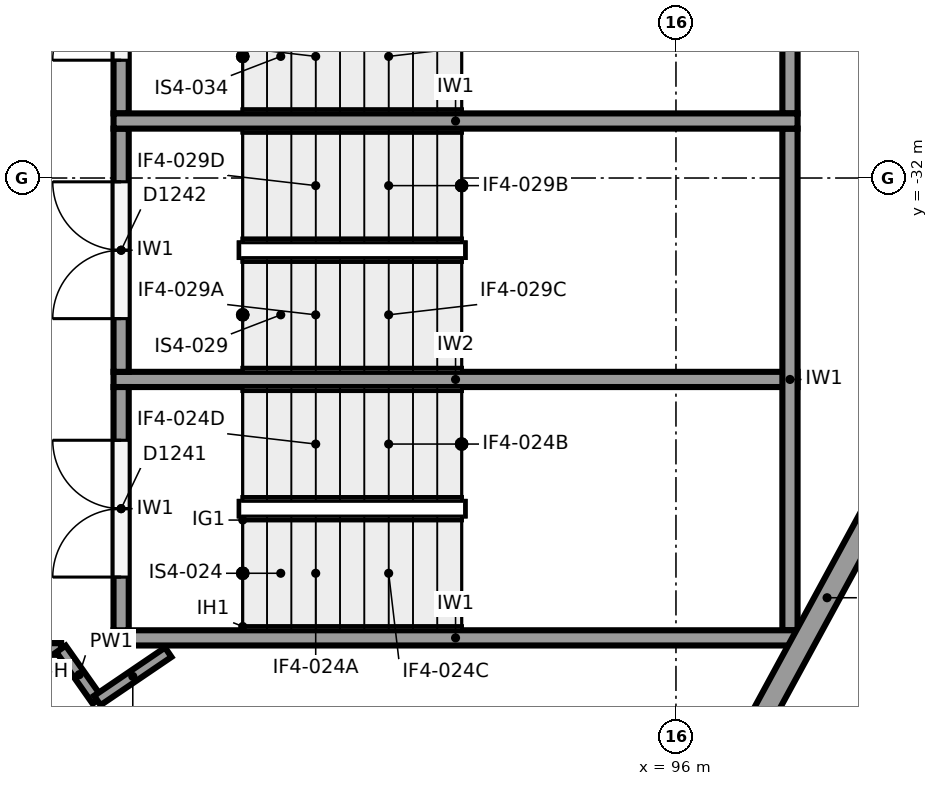
"""IFC4 building model, lengths in metres.
Left out: names, types, materials, properties, quantities, classifications, styles, units other than length and angle.
Written with IfcOpenShell. Run it as: python <this file> out.ifc"""

import sys

from ifc_helpers import new_model, si_unit, direction, frame, frame_2d, origin, place, context, subcontext, project, spatial, rectangle, extrude, element, fill, save


model = new_model("IFC4")
c1 = context("Model", 3, precision=1e-05, world=origin(), true_north=direction((0.0, 1.0)))
c2 = subcontext(c1, "Body", "Model", "MODEL_VIEW")
j1 = project(units=[si_unit("LENGTHUNIT", "METRE"), si_unit("PLANEANGLEUNIT", "RADIAN")], contexts=[c1])
p1 = place(None, origin())
s1 = spatial("IfcSite", under=j1, at=p1, CompositionType="ELEMENT")
p2 = place(p1, origin())
s2 = spatial("IfcBuilding", under=s1, at=p2, CompositionType="ELEMENT")
p3 = place(p2, frame((0.0, 0.0, 12.0)))
s3 = spatial("IfcBuildingStorey", under=s2, at=p3, CompositionType="ELEMENT", Elevation=12.0)
p4 = place(p3, frame((101.161, -31.689, 0.0), z_axis=(0.0, 0.0, 1.0), x_axis=(-0.477867771117, -0.878431780691, 0.0)))
e1 = element("IfcWall", 1, at=p4, inside=s3, PredefinedType="SOLIDWALL", context=c2, shape_type="SweptSolid", body=[
    extrude(rectangle(XDim=13.28, YDim=0.3, at=frame_2d((6.64, 0.0))), origin(), (0.0, 0.0, 1.0), 4.35),
])
p5 = place(p4, frame((9.03, 0.0, 0.0)))
e2 = element("IfcOpeningElement", 2, at=p5, cuts=e1, PredefinedType="OPENING", context=c2, shape_type="SweptSolid", body=[
    extrude(rectangle(XDim=1.8, YDim=2.4, at=frame_2d((0.9, 1.2))), frame((0.0, 0.16, 0.0), z_axis=(0.0, -1.0, 0.0), x_axis=(1.0, 0.0, 0.0)), (0.0, 0.0, 1.0), 0.32),
])
p6 = place(p3, frame((94.815, -19.145, 0.0), z_axis=(0.0, 0.0, 1.0), x_axis=(0.477867771117, -0.878431780691, 0.0)))
e3 = element("IfcWall", 3, at=p6, inside=s3, PredefinedType="SOLIDWALL", context=c2, shape_type="SweptSolid", body=[
    extrude(rectangle(XDim=13.28, YDim=0.3, at=frame_2d((6.64, 0.0))), origin(), (0.0, 0.0, 1.0), 4.35),
])
for number, where, z_axis, x_axis in (
    (4, (97.6, -38.05, 0.0), (0.0, 0.0, 1.0), (-1.0, 0.0, 0.0)),
    (5, (97.6, -31.25, 0.0), (0.0, 0.0, 1.0), (-1.0, 0.0, 0.0)),
):
    element("IfcWall", number, at=place(p3, frame(where, z_axis=z_axis, x_axis=x_axis)), inside=s3, PredefinedType="SHEAR", context=c2, shape_type="SweptSolid", body=[
        extrude(rectangle(XDim=9.0, YDim=0.2, at=frame_2d((4.5, 0.0))), origin(), (0.0, 0.0, 1.0), 5.65),
    ])
for number, where, z_axis, x_axis in (
    (6, (97.5, -37.95, 0.0), (0.0, 0.0, 1.0), (0.0, 1.0, 0.0)),
    (7, (97.5, -31.15, 0.0), (0.0, 0.0, 1.0), (0.0, 1.0, 0.0)),
):
    element("IfcWall", number, at=place(p3, frame(where, z_axis=z_axis, x_axis=x_axis)), inside=s3, PredefinedType="SHEAR", context=c2, shape_type="SweptSolid", body=[
        extrude(rectangle(XDim=6.6, YDim=0.2, at=frame_2d((3.3, 0.0))), origin(), (0.0, 0.0, 1.0), 5.65),
    ])
p7 = place(p3, frame((97.6, -34.65, 0.0), z_axis=(0.0, 0.0, 1.0), x_axis=(-1.0, 0.0, 0.0)))
e8 = element("IfcWall", 8, at=p7, inside=s3, PredefinedType="SHEAR", context=c2, shape_type="SweptSolid", body=[
    extrude(rectangle(XDim=9.0, YDim=0.2, at=frame_2d((4.5, 0.0))), origin(), (0.0, 0.0, 1.0), 5.65),
])
p8 = place(p3, frame((88.7, -37.95, 0.0), z_axis=(0.0, 0.0, 1.0), x_axis=(0.0, 1.0, 0.0)))
e9 = element("IfcWall", 9, at=p8, inside=s3, PredefinedType="SHEAR", context=c2, shape_type="SweptSolid", body=[
    extrude(rectangle(XDim=3.2, YDim=0.2, at=frame_2d((1.6, 0.0))), origin(), (0.0, 0.0, 1.0), 5.65),
])
p9 = place(p8, frame((0.7, 0.0, 0.0)))
e10 = element("IfcOpeningElement", 10, at=p9, cuts=e9, PredefinedType="OPENING", context=c2, shape_type="SweptSolid", body=[
    extrude(rectangle(XDim=1.8, YDim=2.1, at=frame_2d((0.9, 1.05))), frame((0.0, 0.11, 0.0), z_axis=(0.0, -1.0, 0.0), x_axis=(1.0, 0.0, 0.0)), (0.0, 0.0, 1.0), 0.22),
])
p10 = place(p3, frame((88.7, -34.55, 0.0), z_axis=(0.0, 0.0, 1.0), x_axis=(0.0, 1.0, 0.0)))
e11 = element("IfcWall", 11, at=p10, inside=s3, PredefinedType="SHEAR", context=c2, shape_type="SweptSolid", body=[
    extrude(rectangle(XDim=3.2, YDim=0.2, at=frame_2d((1.6, 0.0))), origin(), (0.0, 0.0, 1.0), 5.65),
])
p11 = place(p10, frame((0.7, 0.0, 0.0)))
e12 = element("IfcOpeningElement", 12, at=p11, cuts=e11, PredefinedType="OPENING", context=c2, shape_type="SweptSolid", body=[
    extrude(rectangle(XDim=1.8, YDim=2.1, at=frame_2d((0.9, 1.05))), frame((0.0, 0.11, 0.0), z_axis=(0.0, -1.0, 0.0), x_axis=(1.0, 0.0, 0.0)), (0.0, 0.0, 1.0), 0.22),
])
p12 = place(p3, frame((88.7, -31.15, 0.0), z_axis=(0.0, 0.0, 1.0), x_axis=(0.0, 1.0, 0.0)))
e13 = element("IfcWall", 13, at=p12, inside=s3, PredefinedType="SHEAR", context=c2, shape_type="SweptSolid", body=[
    extrude(rectangle(XDim=3.2, YDim=0.2, at=frame_2d((1.6, 0.0))), origin(), (0.0, 0.0, 1.0), 5.65),
])
p13 = place(p12, frame((0.7, 0.0, 0.0)))
e14 = element("IfcOpeningElement", 14, at=p13, cuts=e13, PredefinedType="OPENING", context=c2, shape_type="SweptSolid", body=[
    extrude(rectangle(XDim=1.8, YDim=2.1, at=frame_2d((0.9, 1.05))), frame((0.0, 0.11, 0.0), z_axis=(0.0, -1.0, 0.0), x_axis=(1.0, 0.0, 0.0)), (0.0, 0.0, 1.0), 0.22),
])
p14 = place(p3, frame((81.555, -38.195, 0.0), z_axis=(0.0, 0.0, 1.0), x_axis=(1.0, 0.0, 0.0)))
e15 = element("IfcWall", 15, at=p14, inside=s3, PredefinedType="PARTITIONING", context=c2, shape_type="SweptSolid", body=[
    extrude(rectangle(XDim=6.354, YDim=0.15, at=frame_2d((3.177, 0.0))), origin(), (0.0, 0.0, 1.0), 4.35),
])
p15 = place(p14, frame((3.85, 0.0, 0.0)))
e16 = element("IfcOpeningElement", 16, at=p15, cuts=e15, PredefinedType="OPENING", context=c2, shape_type="SweptSolid", body=[
    extrude(rectangle(XDim=1.8, YDim=2.1, at=frame_2d((0.9, 1.05))), frame((0.0, 0.085, 0.0), z_axis=(0.0, -1.0, 0.0), x_axis=(1.0, 0.0, 0.0)), (0.0, 0.0, 1.0), 0.17),
])
p16 = place(p3, frame((87.255, -38.195, 4.35), z_axis=(0.0, 0.0, 1.0), x_axis=(1.0, 0.0, 0.0)))
e17 = element("IfcWall", 17, at=p16, inside=s3, PredefinedType="PARTITIONING", context=c2, shape_type="SweptSolid", body=[
    extrude(rectangle(XDim=0.654, YDim=0.15, at=frame_2d((0.327, 0.0))), origin(), (0.0, 0.0, 1.0), 1.3),
])
p17 = place(p3, frame((87.909, -38.195, 0.0), z_axis=(0.0, 0.0, 1.0), x_axis=(0.575573582652, -0.81774999294, 0.0)))
e18 = element("IfcWall", 18, at=p17, inside=s3, PredefinedType="PARTITIONING", context=c2, shape_type="SweptSolid", body=[
    extrude(rectangle(XDim=0.83, YDim=0.15, at=frame_2d((0.415, 0.0))), origin(), (0.0, 0.0, 1.0), 5.65),
])
p18 = place(p3, frame((88.387, -38.874, 0.0), z_axis=(0.0, 0.0, 1.0), x_axis=(0.827055308354, 0.562120553728, 0.0)))
e19 = element("IfcWall", 19, at=p18, inside=s3, PredefinedType="PARTITIONING", context=c2, shape_type="SweptSolid", body=[
    extrude(rectangle(XDim=1.128, YDim=0.15, at=frame_2d((0.564, 0.0))), origin(), (0.0, 0.0, 1.0), 5.65),
])
p19 = place(p9, origin())
e20 = element("IfcDoor", 20, at=p19, inside=s3, OperationType="DOUBLE_DOOR_SINGLE_SWING", PredefinedType="DOOR", context=c2, shape_type="SweptSolid", body=[
    extrude(rectangle(XDim=1.8, YDim=2.1, at=frame_2d((0.9, 1.05))), frame((0.0, 0.025, 0.0), z_axis=(0.0, -1.0, 0.0), x_axis=(1.0, 0.0, 0.0)), (0.0, 0.0, 1.0), 0.05),
])
fill(e10, e20)
p20 = place(p11, origin())
e21 = element("IfcDoor", 21, at=p20, inside=s3, OperationType="DOUBLE_DOOR_SINGLE_SWING", PredefinedType="DOOR", context=c2, shape_type="SweptSolid", body=[
    extrude(rectangle(XDim=1.8, YDim=2.1, at=frame_2d((0.9, 1.05))), frame((0.0, 0.025, 0.0), z_axis=(0.0, -1.0, 0.0), x_axis=(1.0, 0.0, 0.0)), (0.0, 0.0, 1.0), 0.05),
])
fill(e12, e21)
p21 = place(p13, origin())
e22 = element("IfcDoor", 22, at=p21, inside=s3, OperationType="DOUBLE_DOOR_SINGLE_SWING", PredefinedType="DOOR", context=c2, shape_type="SweptSolid", body=[
    extrude(rectangle(XDim=1.8, YDim=2.1, at=frame_2d((0.9, 1.05))), frame((0.0, 0.025, 0.0), z_axis=(0.0, -1.0, 0.0), x_axis=(1.0, 0.0, 0.0)), (0.0, 0.0, 1.0), 0.05),
])
fill(e14, e22)
save(model, sys.argv[1])
